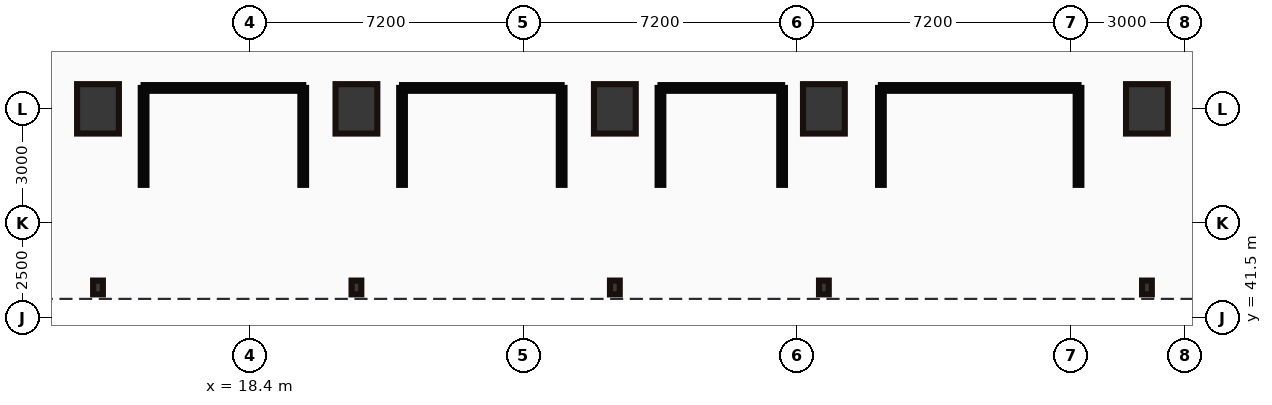
"""IFC4 building model, lengths in metres.
Left out: names, types, materials, properties, quantities, classifications, styles, units other than length and angle.
Written with IfcOpenShell. Run it as: python <this file> out.ifc"""

import sys

from ifc_helpers import new_model, si_unit, direction, frame, frame_2d, origin, origin_2d, place, context, subcontext, project, spatial, rectangle, hollow_rectangle, i_section, extrude, source, transform, mapped, element, fill, save


model = new_model("IFC4")
c1 = context("Model", 3, precision=1e-05, world=origin(), true_north=direction((0.0, 1.0)))
c2 = subcontext(c1, "Body", "Model", "MODEL_VIEW")
j1 = project(units=[si_unit("LENGTHUNIT", "METRE"), si_unit("PLANEANGLEUNIT", "RADIAN")], contexts=[c1])
p1 = place(None, origin())
s1 = spatial("IfcSite", under=j1, at=p1, CompositionType="ELEMENT")
p2 = place(p1, origin())
s2 = spatial("IfcBuilding", under=s1, at=p2, CompositionType="ELEMENT")
p3 = place(p2, frame((0.0, 0.0, 6.0)))
s3 = spatial("IfcBuildingStorey", under=s2, at=p3, CompositionType="ELEMENT", Elevation=6.0)
m1 = source(origin(), c2, "Body", "SweptSolid", [
    extrude(hollow_rectangle(XDim=1.1, YDim=1.3, WallThickness=0.055, at=origin_2d()), origin(), (0.0, 0.0, 1.0), 5.0),
])
for number, where, z_axis, x_axis in (
    (1, (14.4, 47.0, 0.0), (0.0, 0.0, 1.0), (1.0, 0.0, 0.0)),
    (2, (21.2, 47.0, 0.0), (0.0, 0.0, 1.0), (1.0, 0.0, 0.0)),
    (3, (28.0, 47.0, 0.0), (0.0, 0.0, 1.0), (1.0, 0.0, 0.0)),
    (4, (33.5, 47.0, 0.0), (0.0, 0.0, 1.0), (1.0, 0.0, 0.0)),
    (5, (42.0, 47.0, 0.0), (0.0, 0.0, 1.0), (1.0, 0.0, 0.0)),
):
    element("IfcColumn", number, at=place(p3, frame(where, z_axis=z_axis, x_axis=x_axis)), inside=s3, PredefinedType="PILASTER", context=c2, shape_type="MappedRepresentation", body=[
        mapped(m1, transform((0.0, 0.0, 0.0))),
    ])
m2 = source(origin(), c2, "Body", "SweptSolid", [
    extrude(i_section(OverallWidth=0.257, OverallDepth=0.363, WebThickness=0.013, FlangeThickness=0.022, at=origin_2d()), origin(), (0.0, 0.0, 1.0), 5.0),
])
for number, where, z_axis, x_axis in (
    (6, (14.4, 42.3, 0.0), (0.0, 0.0, 1.0), (1.0, 0.0, 0.0)),
    (7, (21.2, 42.3, 0.0), (0.0, 0.0, 1.0), (1.0, 0.0, 0.0)),
    (8, (28.0, 42.3, 0.0), (0.0, 0.0, 1.0), (1.0, 0.0, 0.0)),
    (9, (33.5, 42.3, 0.0), (0.0, 0.0, 1.0), (1.0, 0.0, 0.0)),
    (10, (42.0, 42.3, 0.0), (0.0, 0.0, 1.0), (1.0, 0.0, 0.0)),
):
    element("IfcColumn", number, at=place(p3, frame(where, z_axis=z_axis, x_axis=x_axis)), inside=s3, PredefinedType="COLUMN", context=c2, shape_type="MappedRepresentation", body=[
        mapped(m2, transform((0.0, 0.0, 0.0))),
    ])
m3 = source(origin(), c2, "Body", "SweptSolid", [
    extrude(rectangle(XDim=2.55, YDim=0.15, at=frame_2d((1.275, 0.0))), origin(), (0.0, 0.0, 1.0), 4.7),
])
for number, where, z_axis, x_axis in (
    (11, (15.6, 45.0, 0.0), (0.0, 0.0, 1.0), (0.0, 1.0, 0.0)),
    (12, (19.8, 45.0, 0.0), (0.0, 0.0, 1.0), (0.0, 1.0, 0.0)),
):
    element("IfcWall", number, at=place(p3, frame(where, z_axis=z_axis, x_axis=x_axis)), inside=s3, PredefinedType="PARTITIONING", context=c2, shape_type="MappedRepresentation", body=[
        mapped(m3, transform((0.0, 0.0, 0.0))),
    ])
m4 = source(origin(), c2, "Body", "SweptSolid", [
    extrude(rectangle(XDim=4.2, YDim=0.15, at=frame_2d((2.1, 0.0))), origin(), (0.0, 0.0, 1.0), 4.7),
])
p4 = place(p3, frame((15.6, 47.55, 0.0), z_axis=(0.0, 0.0, 1.0), x_axis=(1.0, 0.0, 0.0)))
e13 = element("IfcWall", 13, at=p4, inside=s3, PredefinedType="PARTITIONING", context=c2, shape_type="MappedRepresentation", body=[
    mapped(m4, transform((0.0, 0.0, 0.0))),
])
p5 = place(p4, frame((1.55, 0.0, 0.0)))
e14 = element("IfcOpeningElement", 14, at=p5, cuts=e13, PredefinedType="OPENING", context=c2, shape_type="SweptSolid", body=[
    extrude(rectangle(XDim=1.1, YDim=2.15, at=frame_2d((0.55, 1.075))), frame((0.0, 0.085, 0.0), z_axis=(0.0, -1.0, 0.0), x_axis=(1.0, 0.0, 0.0)), (0.0, 0.0, 1.0), 0.17),
])
for number, where, z_axis, x_axis in (
    (15, (22.4, 45.0, 0.0), (0.0, 0.0, 1.0), (0.0, 1.0, 0.0)),
    (16, (26.6, 45.0, 0.0), (0.0, 0.0, 1.0), (0.0, 1.0, 0.0)),
):
    element("IfcWall", number, at=place(p3, frame(where, z_axis=z_axis, x_axis=x_axis)), inside=s3, PredefinedType="PARTITIONING", context=c2, shape_type="MappedRepresentation", body=[
        mapped(m3, transform((0.0, 0.0, 0.0))),
    ])
m5 = source(origin(), c2, "Body", "SweptSolid", [
    extrude(rectangle(XDim=4.2, YDim=0.15, at=frame_2d((2.1, 0.0))), origin(), (0.0, 0.0, 1.0), 4.7),
])
p6 = place(p3, frame((22.4, 47.55, 0.0), z_axis=(0.0, 0.0, 1.0), x_axis=(1.0, 0.0, 0.0)))
e17 = element("IfcWall", 17, at=p6, inside=s3, PredefinedType="PARTITIONING", context=c2, shape_type="MappedRepresentation", body=[
    mapped(m5, transform((0.0, 0.0, 0.0))),
])
p7 = place(p6, frame((1.55, 0.0, 0.0)))
e18 = element("IfcOpeningElement", 18, at=p7, cuts=e17, PredefinedType="OPENING", context=c2, shape_type="SweptSolid", body=[
    extrude(rectangle(XDim=1.1, YDim=2.15, at=frame_2d((0.55, 1.075))), frame((0.0, 0.085, 0.0), z_axis=(0.0, -1.0, 0.0), x_axis=(1.0, 0.0, 0.0)), (0.0, 0.0, 1.0), 0.17),
])
for number, where, z_axis, x_axis in (
    (19, (29.2, 45.0, 0.0), (0.0, 0.0, 1.0), (0.0, 1.0, 0.0)),
    (20, (32.4, 45.0, 0.0), (0.0, 0.0, 1.0), (0.0, 1.0, 0.0)),
):
    element("IfcWall", number, at=place(p3, frame(where, z_axis=z_axis, x_axis=x_axis)), inside=s3, PredefinedType="PARTITIONING", context=c2, shape_type="MappedRepresentation", body=[
        mapped(m3, transform((0.0, 0.0, 0.0))),
    ])
m6 = source(origin(), c2, "Body", "SweptSolid", [
    extrude(rectangle(XDim=3.2, YDim=0.15, at=frame_2d((1.6, 0.0))), origin(), (0.0, 0.0, 1.0), 4.7),
])
p8 = place(p3, frame((29.2, 47.55, 0.0), z_axis=(0.0, 0.0, 1.0), x_axis=(1.0, 0.0, 0.0)))
e21 = element("IfcWall", 21, at=p8, inside=s3, PredefinedType="PARTITIONING", context=c2, shape_type="MappedRepresentation", body=[
    mapped(m6, transform((0.0, 0.0, 0.0))),
])
p9 = place(p8, frame((1.05, 0.0, 0.0)))
e22 = element("IfcOpeningElement", 22, at=p9, cuts=e21, PredefinedType="OPENING", context=c2, shape_type="SweptSolid", body=[
    extrude(rectangle(XDim=1.1, YDim=2.15, at=frame_2d((0.55, 1.075))), frame((0.0, 0.085, 0.0), z_axis=(0.0, -1.0, 0.0), x_axis=(1.0, 0.0, 0.0)), (0.0, 0.0, 1.0), 0.17),
])
for number, where, z_axis, x_axis in (
    (23, (35.0, 45.0, 0.0), (0.0, 0.0, 1.0), (0.0, 1.0, 0.0)),
    (24, (40.2, 45.0, 0.0), (0.0, 0.0, 1.0), (0.0, 1.0, 0.0)),
):
    element("IfcWall", number, at=place(p3, frame(where, z_axis=z_axis, x_axis=x_axis)), inside=s3, PredefinedType="PARTITIONING", context=c2, shape_type="MappedRepresentation", body=[
        mapped(m3, transform((0.0, 0.0, 0.0))),
    ])
m7 = source(origin(), c2, "Body", "SweptSolid", [
    extrude(rectangle(XDim=5.2, YDim=0.15, at=frame_2d((2.6, 0.0))), origin(), (0.0, 0.0, 1.0), 4.7),
])
p10 = place(p3, frame((35.0, 47.55, 0.0), z_axis=(0.0, 0.0, 1.0), x_axis=(1.0, 0.0, 0.0)))
e25 = element("IfcWall", 25, at=p10, inside=s3, PredefinedType="PARTITIONING", context=c2, shape_type="MappedRepresentation", body=[
    mapped(m7, transform((0.0, 0.0, 0.0))),
])
p11 = place(p10, frame((2.05, 0.0, 0.0)))
e26 = element("IfcOpeningElement", 26, at=p11, cuts=e25, PredefinedType="OPENING", context=c2, shape_type="SweptSolid", body=[
    extrude(rectangle(XDim=1.1, YDim=2.15, at=frame_2d((0.55, 1.075))), frame((0.0, 0.085, 0.0), z_axis=(0.0, -1.0, 0.0), x_axis=(1.0, 0.0, 0.0)), (0.0, 0.0, 1.0), 0.17),
])
m8 = source(origin(), c2, "Body", "SweptSolid", [
    extrude(rectangle(XDim=1.1, YDim=2.15, at=frame_2d((0.55, 1.075))), frame((0.0, 0.025, 0.0), z_axis=(0.0, -1.0, 0.0), x_axis=(1.0, 0.0, 0.0)), (0.0, 0.0, 1.0), 0.05),
])
p12 = place(p5, frame((1.1, 0.0, 0.0), z_axis=(0.0, 0.0, 1.0), x_axis=(-1.0, 0.0, 0.0)))
e27 = element("IfcDoor", 27, at=p12, inside=s3, OperationType="SINGLE_SWING_LEFT", PredefinedType="DOOR", context=c2, shape_type="MappedRepresentation", body=[
    mapped(m8, transform((0.0, 0.0, 0.0))),
])
fill(e14, e27)
p13 = place(p7, frame((1.1, 0.0, 0.0), z_axis=(0.0, 0.0, 1.0), x_axis=(-1.0, 0.0, 0.0)))
e28 = element("IfcDoor", 28, at=p13, inside=s3, OperationType="SINGLE_SWING_LEFT", PredefinedType="DOOR", context=c2, shape_type="MappedRepresentation", body=[
    mapped(m8, transform((0.0, 0.0, 0.0))),
])
fill(e18, e28)
p14 = place(p9, frame((1.1, 0.0, 0.0), z_axis=(0.0, 0.0, 1.0), x_axis=(-1.0, 0.0, 0.0)))
e29 = element("IfcDoor", 29, at=p14, inside=s3, OperationType="SINGLE_SWING_LEFT", PredefinedType="DOOR", context=c2, shape_type="MappedRepresentation", body=[
    mapped(m8, transform((0.0, 0.0, 0.0))),
])
fill(e22, e29)
p15 = place(p11, frame((1.1, 0.0, 0.0), z_axis=(0.0, 0.0, 1.0), x_axis=(-1.0, 0.0, 0.0)))
e30 = element("IfcDoor", 30, at=p15, inside=s3, OperationType="SINGLE_SWING_LEFT", PredefinedType="DOOR", context=c2, shape_type="MappedRepresentation", body=[
    mapped(m8, transform((0.0, 0.0, 0.0))),
])
fill(e26, e30)
save(model, sys.argv[1])
